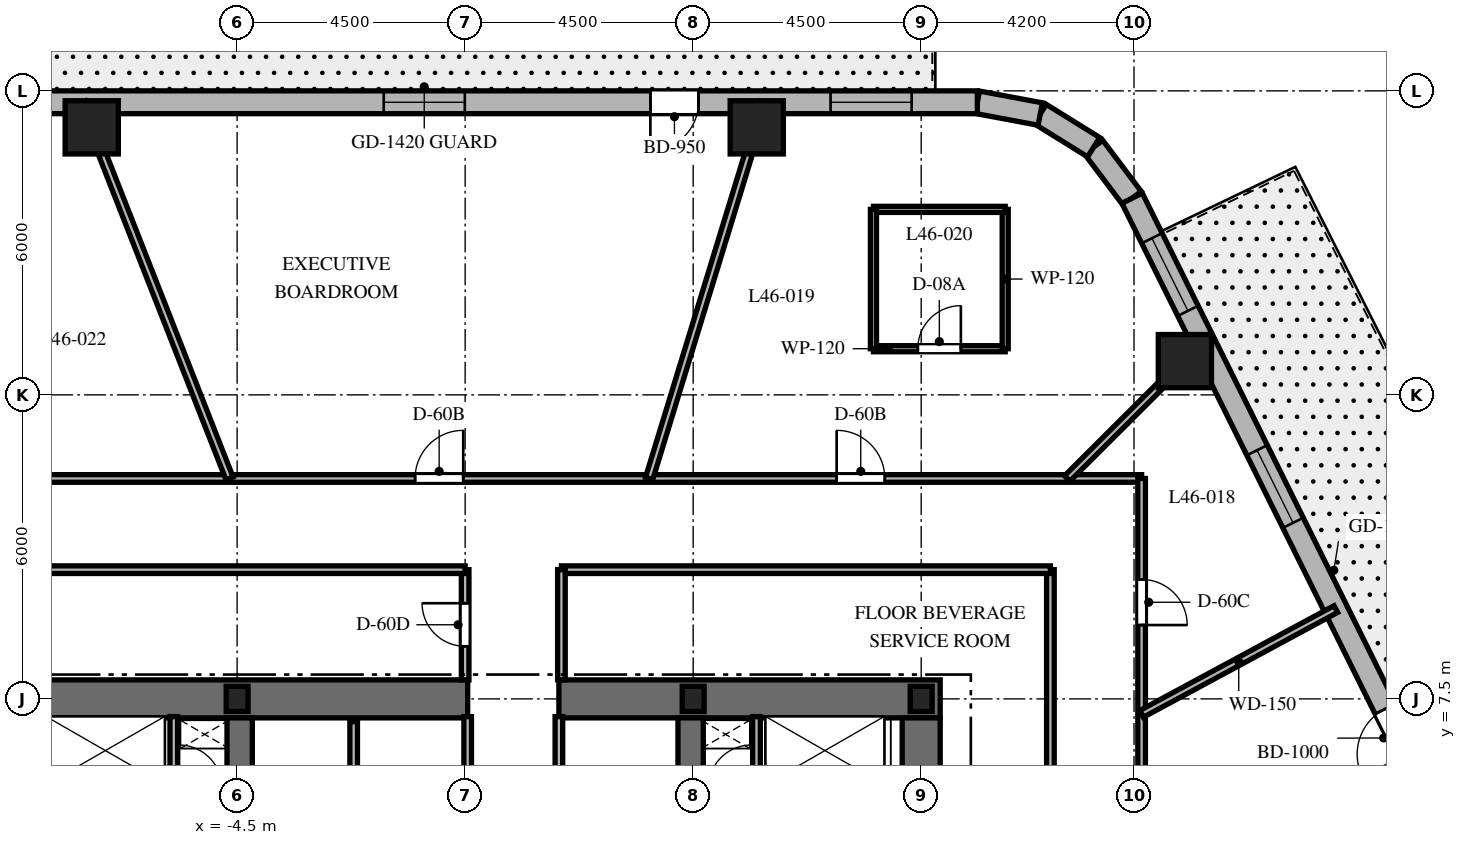
"""IFC4 building model, lengths in metres.
Left out: names, types, materials, properties, quantities, classifications, styles, units other than length and angle.
Written with IfcOpenShell. Run it as: python <this file> out.ifc"""

import sys

from ifc_helpers import new_model, si_unit, direction, frame, frame_2d, origin, origin_2d, place, context, subcontext, project, spatial, rectangle, i_section, extrude, element, fill, save


model = new_model("IFC4")
c1 = context("Model", 3, precision=1e-05, world=origin(), true_north=direction((0.0, 1.0)))
c2 = subcontext(c1, "Body", "Model", "MODEL_VIEW")
j1 = project(units=[si_unit("LENGTHUNIT", "METRE"), si_unit("PLANEANGLEUNIT", "RADIAN")], contexts=[c1])
p1 = place(None, origin())
s1 = spatial("IfcSite", under=j1, at=p1, CompositionType="ELEMENT")
p2 = place(p1, origin())
s2 = spatial("IfcBuilding", under=s1, at=p2, CompositionType="ELEMENT")
p3 = place(p2, frame((0.0, 0.0, 186.7)))
s3 = spatial("IfcBuildingStorey", under=s2, at=p3, CompositionType="ELEMENT", Elevation=186.7)
p4 = place(p3, frame((-9.375, 7.5, 0.0), z_axis=(0.0, 0.0, 1.0), x_axis=(1.0, 0.0, 0.0)))
e1 = element("IfcWall", 1, at=p4, inside=s3, PredefinedType="SHEAR", context=c2, shape_type="SweptSolid", body=[
    extrude(rectangle(XDim=9.425, YDim=0.75, at=frame_2d((4.712, 0.0))), origin(), (0.0, 0.0, 1.0), 3.7),
])
p5 = place(p3, frame((1.85, 7.5, 0.0), z_axis=(0.0, 0.0, 1.0), x_axis=(1.0, 0.0, 0.0)))
e2 = element("IfcWall", 2, at=p5, inside=s3, PredefinedType="SHEAR", context=c2, shape_type="SweptSolid", body=[
    extrude(rectangle(XDim=7.525, YDim=0.75, at=frame_2d((3.762, 0.0))), origin(), (0.0, 0.0, 1.0), 3.7),
])
p6 = place(p3, frame((9.0, -7.125, 0.0), z_axis=(0.0, 0.0, 1.0), x_axis=(0.0, 1.0, 0.0)))
e3 = element("IfcWall", 3, at=p6, inside=s3, PredefinedType="SHEAR", context=c2, shape_type="SweptSolid", body=[
    extrude(rectangle(XDim=14.25, YDim=0.75, at=frame_2d((7.125, 0.0))), origin(), (0.0, 0.0, 1.0), 3.7),
])
p7 = place(p6, frame((10.25, 0.0, 0.0)))
e4 = element("IfcOpeningElement", 4, at=p7, cuts=e3, PredefinedType="OPENING", context=c2, shape_type="SweptSolid", body=[
    extrude(rectangle(XDim=1.05, YDim=2.15, at=frame_2d((0.525, 1.075))), frame((0.0, 0.385, 0.0), z_axis=(0.0, -1.0, 0.0), x_axis=(1.0, 0.0, 0.0)), (0.0, 0.0, 1.0), 0.77),
])
for number, where, z_axis, x_axis in (
    (5, (-4.45, 2.25, 0.0), (0.0, 0.0, 1.0), (0.0, 1.0, 0.0)),
    (6, (4.45, 2.25, 0.0), (0.0, 0.0, 1.0), (0.0, 1.0, 0.0)),
):
    element("IfcWall", number, at=place(p3, frame(where, z_axis=z_axis, x_axis=x_axis)), inside=s3, PredefinedType="SHEAR", context=c2, shape_type="SweptSolid", body=[
        extrude(rectangle(XDim=4.875, YDim=0.5, at=frame_2d((2.438, 0.0))), origin(), (0.0, 0.0, 1.0), 3.7),
    ])
for number, where, z_axis, x_axis in (
    (7, (9.0, 7.5, 0.0), (0.0, 0.0, 1.0), (1.0, 0.0, 0.0)),
    (8, (4.5, 7.5, 0.0), (0.0, 0.0, 1.0), (1.0, 0.0, 0.0)),
    (9, (-4.5, 7.5, 0.0), (0.0, 0.0, 1.0), (1.0, 0.0, 0.0)),
):
    element("IfcColumn", number, at=place(p3, frame(where, z_axis=z_axis, x_axis=x_axis)), inside=s3, PredefinedType="COLUMN", context=c2, shape_type="SweptSolid", body=[
        extrude(i_section(OverallWidth=0.432, OverallDepth=0.498, WebThickness=0.056, FlangeThickness=0.089, at=origin_2d()), origin(), (0.0, 0.0, 1.0), 3.7),
    ])
for number, where, z_axis, x_axis in (
    (10, (14.204, 14.166, 0.0), (0.0, 0.0, 1.0), (1.0, 0.0, 0.0)),
    (11, (5.755, 18.78, 0.0), (0.0, 0.0, 1.0), (1.0, 0.0, 0.0)),
    (12, (-7.369, 18.78, 0.0), (0.0, 0.0, 1.0), (1.0, 0.0, 0.0)),
):
    element("IfcColumn", number, at=place(p3, frame(where, z_axis=z_axis, x_axis=x_axis)), inside=s3, PredefinedType="COLUMN", context=c2, shape_type="SweptSolid", body=[
        extrude(rectangle(XDim=1.05, YDim=1.05, at=origin_2d()), origin(), (0.0, 0.0, 1.0), 3.7),
    ])
p8 = place(p3, frame((13.162, 17.381, 0.0), z_axis=(0.0, 0.0, 1.0), x_axis=(-0.601515770517, 0.798860925205, 0.0)))
e13 = element("IfcWall", 13, at=p8, inside=s3, PredefinedType="SOLIDWALL", context=c2, shape_type="SweptSolid", body=[
    extrude(rectangle(XDim=1.262, YDim=0.45, at=frame_2d((0.631, 0.0))), origin(), (0.0, 0.0, 1.0), 3.4),
])
p9 = place(p3, frame((12.403, 18.389, 0.0), z_axis=(0.0, 0.0, 1.0), x_axis=(-0.849795170926, 0.527113049991, 0.0)))
e14 = element("IfcWall", 14, at=p9, inside=s3, PredefinedType="SOLIDWALL", context=c2, shape_type="SweptSolid", body=[
    extrude(rectangle(XDim=1.241, YDim=0.45, at=frame_2d((0.62, 0.0))), origin(), (0.0, 0.0, 1.0), 3.4),
])
p10 = place(p3, frame((11.349, 19.043, 0.0), z_axis=(0.0, 0.0, 1.0), x_axis=(-0.982931267051, 0.183973161772, 0.0)))
e15 = element("IfcWall", 15, at=p10, inside=s3, PredefinedType="SOLIDWALL", context=c2, shape_type="SweptSolid", body=[
    extrude(rectangle(XDim=1.262, YDim=0.45, at=frame_2d((0.631, 0.0))), origin(), (0.0, 0.0, 1.0), 3.4),
])
p11 = place(p3, frame((20.618, 2.344, 0.0), z_axis=(0.0, 0.0, 1.0), x_axis=(-0.444243691097, 0.895905990002, 0.0)))
e16 = element("IfcWall", 16, at=p11, inside=s3, PredefinedType="SOLIDWALL", context=c2, shape_type="SweptSolid", body=[
    extrude(rectangle(XDim=16.784, YDim=0.45, at=frame_2d((8.392, 0.0))), origin(), (0.0, 0.0, 1.0), 3.4),
])
p12 = place(p11, frame((4.535, 0.0, 0.0)))
e17 = element("IfcOpeningElement", 17, at=p12, cuts=e16, PredefinedType="OPENING", context=c2, shape_type="SweptSolid", body=[
    extrude(rectangle(XDim=1.0, YDim=2.15, at=frame_2d((0.5, 1.075))), frame((0.0, 0.235, 0.0), z_axis=(0.0, -1.0, 0.0), x_axis=(1.0, 0.0, 0.0)), (0.0, 0.0, 1.0), 0.47),
])
p13 = place(p11, frame((9.633, 0.0, 0.8)))
e18 = element("IfcOpeningElement", 18, at=p13, cuts=e16, PredefinedType="OPENING", context=c2, shape_type="SweptSolid", body=[
    extrude(rectangle(XDim=1.6, YDim=1.75, at=frame_2d((0.8, 0.875))), frame((0.0, 0.235, 0.0), z_axis=(0.0, -1.0, 0.0), x_axis=(1.0, 0.0, 0.0)), (0.0, 0.0, 1.0), 0.47),
])
p14 = place(p11, frame((14.303, 0.0, 0.8)))
e19 = element("IfcOpeningElement", 19, at=p14, cuts=e16, PredefinedType="OPENING", context=c2, shape_type="SweptSolid", body=[
    extrude(rectangle(XDim=1.6, YDim=1.75, at=frame_2d((0.8, 0.875))), frame((0.0, 0.235, 0.0), z_axis=(0.0, -1.0, 0.0), x_axis=(1.0, 0.0, 0.0)), (0.0, 0.0, 1.0), 0.47),
])
p15 = place(p11, frame((0.931, 0.0, 0.8)))
e20 = element("IfcOpeningElement", 20, at=p15, cuts=e16, PredefinedType="OPENING", context=c2, shape_type="SweptSolid", body=[
    extrude(rectangle(XDim=1.6, YDim=1.75, at=frame_2d((0.8, 0.875))), frame((0.0, 0.235, 0.0), z_axis=(0.0, -1.0, 0.0), x_axis=(1.0, 0.0, 0.0)), (0.0, 0.0, 1.0), 0.47),
])
p16 = place(p3, frame((10.108, 19.275, 0.0), z_axis=(0.0, 0.0, 1.0), x_axis=(-1.0, 0.0, 0.0)))
e21 = element("IfcWall", 21, at=p16, inside=s3, PredefinedType="SOLIDWALL", context=c2, shape_type="SweptSolid", body=[
    extrude(rectangle(XDim=21.829, YDim=0.45, at=frame_2d((10.915, 0.0))), origin(), (0.0, 0.0, 1.0), 3.4),
])
p17 = place(p16, frame((5.503, 0.0, 0.0)))
e22 = element("IfcOpeningElement", 22, at=p17, cuts=e21, PredefinedType="OPENING", context=c2, shape_type="SweptSolid", body=[
    extrude(rectangle(XDim=0.95, YDim=2.15, at=frame_2d((0.475, 1.075))), frame((0.0, 0.235, 0.0), z_axis=(0.0, -1.0, 0.0), x_axis=(1.0, 0.0, 0.0)), (0.0, 0.0, 1.0), 0.47),
])
p18 = place(p16, frame((1.297, 0.0, 0.8)))
e23 = element("IfcOpeningElement", 23, at=p18, cuts=e21, PredefinedType="OPENING", context=c2, shape_type="SweptSolid", body=[
    extrude(rectangle(XDim=1.6, YDim=1.75, at=frame_2d((0.8, 0.875))), frame((0.0, 0.235, 0.0), z_axis=(0.0, -1.0, 0.0), x_axis=(1.0, 0.0, 0.0)), (0.0, 0.0, 1.0), 0.47),
])
p19 = place(p16, frame((10.115, 0.0, 0.8)))
e24 = element("IfcOpeningElement", 24, at=p19, cuts=e21, PredefinedType="OPENING", context=c2, shape_type="SweptSolid", body=[
    extrude(rectangle(XDim=1.6, YDim=1.75, at=frame_2d((0.8, 0.875))), frame((0.0, 0.235, 0.0), z_axis=(0.0, -1.0, 0.0), x_axis=(1.0, 0.0, 0.0)), (0.0, 0.0, 1.0), 0.47),
])
p20 = place(p16, frame((18.933, 0.0, 0.8)))
e25 = element("IfcOpeningElement", 25, at=p20, cuts=e21, PredefinedType="OPENING", context=c2, shape_type="SweptSolid", body=[
    extrude(rectangle(XDim=1.6, YDim=1.75, at=frame_2d((0.8, 0.875))), frame((0.0, 0.235, 0.0), z_axis=(0.0, -1.0, 0.0), x_axis=(1.0, 0.0, 0.0)), (0.0, 0.0, 1.0), 0.47),
])
for number, where, z_axis, x_axis in (
    (26, (-5.75, 5.74, 0.0), (0.0, 0.0, 1.0), (0.0, 1.0, 0.0)),
    (27, (5.75, 5.74, 0.0), (0.0, 0.0, 1.0), (0.0, 1.0, 0.0)),
):
    element("IfcWall", number, at=place(p3, frame(where, z_axis=z_axis, x_axis=x_axis)), inside=s3, PredefinedType="PARTITIONING", context=c2, shape_type="SweptSolid", body=[
        extrude(rectangle(XDim=1.41, YDim=0.15, at=frame_2d((0.705, 0.0))), origin(), (0.0, 0.0, 1.0), 3.4),
    ])
p21 = place(p3, frame((-2.2, 5.2, 0.0), z_axis=(0.0, 0.0, 1.0), x_axis=(0.0, 1.0, 0.0)))
e28 = element("IfcWall", 28, at=p21, inside=s3, PredefinedType="PARTITIONING", context=c2, shape_type="SweptSolid", body=[
    extrude(rectangle(XDim=1.85, YDim=0.15, at=frame_2d((0.925, 0.0))), origin(), (0.0, 0.0, 1.0), 3.4),
])
for number, where, z_axis, x_axis in (
    (29, (0.05, 5.2, 0.0), (0.0, 0.0, 1.0), (0.0, 1.0, 0.0)),
    (30, (1.85, 5.2, 0.0), (0.0, 0.0, 1.0), (0.0, 1.0, 0.0)),
):
    element("IfcWall", number, at=place(p3, frame(where, z_axis=z_axis, x_axis=x_axis)), inside=s3, PredefinedType="PARTITIONING", context=c2, shape_type="SweptSolid", body=[
        extrude(rectangle(XDim=1.95, YDim=0.15, at=frame_2d((0.975, 0.0))), origin(), (0.0, 0.0, 1.0), 3.4),
    ])
p22 = place(p3, frame((-13.35, 11.85, 0.0), z_axis=(0.0, 0.0, 1.0), x_axis=(1.0, 0.0, 0.0)))
e31 = element("IfcWall", 31, at=p22, inside=s3, PredefinedType="PARTITIONING", context=c2, shape_type="SweptSolid", body=[
    extrude(rectangle(XDim=26.7, YDim=0.15, at=frame_2d((13.35, 0.0))), origin(), (0.0, 0.0, 1.0), 2.84),
])
p23 = place(p22, frame((20.682, 0.0, 0.0)))
e32 = element("IfcOpeningElement", 32, at=p23, cuts=e31, PredefinedType="OPENING", context=c2, shape_type="SweptSolid", body=[
    extrude(rectangle(XDim=0.95, YDim=2.03, at=frame_2d((0.475, 1.015))), frame((0.0, 0.085, 0.0), z_axis=(0.0, -1.0, 0.0), x_axis=(1.0, 0.0, 0.0)), (0.0, 0.0, 1.0), 0.17),
])
p24 = place(p22, frame((12.362, 0.0, 0.0)))
e33 = element("IfcOpeningElement", 33, at=p24, cuts=e31, PredefinedType="OPENING", context=c2, shape_type="SweptSolid", body=[
    extrude(rectangle(XDim=0.95, YDim=2.03, at=frame_2d((0.475, 1.015))), frame((0.0, 0.085, 0.0), z_axis=(0.0, -1.0, 0.0), x_axis=(1.0, 0.0, 0.0)), (0.0, 0.0, 1.0), 0.17),
])
p25 = place(p22, frame((3.995, 0.0, 0.0)))
e34 = element("IfcOpeningElement", 34, at=p25, cuts=e31, PredefinedType="OPENING", context=c2, shape_type="SweptSolid", body=[
    extrude(rectangle(XDim=0.95, YDim=2.03, at=frame_2d((0.475, 1.015))), frame((0.0, 0.085, 0.0), z_axis=(0.0, -1.0, 0.0), x_axis=(1.0, 0.0, 0.0)), (0.0, 0.0, 1.0), 0.17),
])
p26 = place(p3, frame((13.35, 11.85, 0.0), z_axis=(0.0, 0.0, 1.0), x_axis=(0.0, -1.0, 0.0)))
e35 = element("IfcWall", 35, at=p26, inside=s3, PredefinedType="PARTITIONING", context=c2, shape_type="SweptSolid", body=[
    extrude(rectangle(XDim=23.7, YDim=0.15, at=frame_2d((11.85, 0.0))), origin(), (0.0, 0.0, 1.0), 2.84),
])
p27 = place(p26, frame((5.951, 0.0, 0.0)))
e36 = element("IfcOpeningElement", 36, at=p27, cuts=e35, PredefinedType="OPENING", context=c2, shape_type="SweptSolid", body=[
    extrude(rectangle(XDim=0.9, YDim=2.03, at=frame_2d((0.45, 1.015))), frame((0.0, 0.085, 0.0), z_axis=(0.0, -1.0, 0.0), x_axis=(1.0, 0.0, 0.0)), (0.0, 0.0, 1.0), 0.17),
])
p28 = place(p26, frame((1.993, 0.0, 0.0)))
e37 = element("IfcOpeningElement", 37, at=p28, cuts=e35, PredefinedType="OPENING", context=c2, shape_type="SweptSolid", body=[
    extrude(rectangle(XDim=0.9, YDim=2.03, at=frame_2d((0.45, 1.015))), frame((0.0, 0.085, 0.0), z_axis=(0.0, -1.0, 0.0), x_axis=(1.0, 0.0, 0.0)), (0.0, 0.0, 1.0), 0.17),
])
p29 = place(p26, frame((18.364, 0.0, 0.0)))
e38 = element("IfcOpeningElement", 38, at=p29, cuts=e35, PredefinedType="OPENING", context=c2, shape_type="SweptSolid", body=[
    extrude(rectangle(XDim=1.0, YDim=2.03, at=frame_2d((0.5, 1.015))), frame((0.0, 0.085, 0.0), z_axis=(0.0, -1.0, 0.0), x_axis=(1.0, 0.0, 0.0)), (0.0, 0.0, 1.0), 0.17),
])
p30 = place(p3, frame((11.55, 4.6, 0.0), z_axis=(0.0, 0.0, 1.0), x_axis=(0.0, 1.0, 0.0)))
e39 = element("IfcWall", 39, at=p30, inside=s3, PredefinedType="PARTITIONING", context=c2, shape_type="SweptSolid", body=[
    extrude(rectangle(XDim=5.45, YDim=0.15, at=frame_2d((2.725, 0.0))), origin(), (0.0, 0.0, 1.0), 2.84),
])
p31 = place(p3, frame((11.55, 10.05, 0.0), z_axis=(0.0, 0.0, 1.0), x_axis=(-1.0, 0.0, 0.0)))
e40 = element("IfcWall", 40, at=p31, inside=s3, PredefinedType="PARTITIONING", context=c2, shape_type="SweptSolid", body=[
    extrude(rectangle(XDim=9.65, YDim=0.15, at=frame_2d((4.825, 0.0))), origin(), (0.0, 0.0, 1.0), 2.84),
])
p32 = place(p3, frame((1.9, 10.05, 0.0), z_axis=(0.0, 0.0, 1.0), x_axis=(0.0, -1.0, 0.0)))
e41 = element("IfcWall", 41, at=p32, inside=s3, PredefinedType="PARTITIONING", context=c2, shape_type="SweptSolid", body=[
    extrude(rectangle(XDim=2.175, YDim=0.15, at=frame_2d((1.087, 0.0))), origin(), (0.0, 0.0, 1.0), 3.4),
])
p33 = place(p3, frame((0.0, 7.875, 0.0), z_axis=(0.0, 0.0, 1.0), x_axis=(0.0, 1.0, 0.0)))
e42 = element("IfcWall", 42, at=p33, inside=s3, PredefinedType="PARTITIONING", context=c2, shape_type="SweptSolid", body=[
    extrude(rectangle(XDim=2.175, YDim=0.15, at=frame_2d((1.087, 0.0))), origin(), (0.0, 0.0, 1.0), 3.4),
])
p34 = place(p33, frame((0.663, 0.0, 0.0)))
e43 = element("IfcOpeningElement", 43, at=p34, cuts=e42, PredefinedType="OPENING", context=c2, shape_type="SweptSolid", body=[
    extrude(rectangle(XDim=0.85, YDim=2.03, at=frame_2d((0.425, 1.015))), frame((0.0, 0.085, 0.0), z_axis=(0.0, -1.0, 0.0), x_axis=(1.0, 0.0, 0.0)), (0.0, 0.0, 1.0), 0.17),
])
p35 = place(p3, frame((0.0, 10.05, 0.0), z_axis=(0.0, 0.0, 1.0), x_axis=(-1.0, 0.0, 0.0)))
e44 = element("IfcWall", 44, at=p35, inside=s3, PredefinedType="PARTITIONING", context=c2, shape_type="SweptSolid", body=[
    extrude(rectangle(XDim=11.55, YDim=0.15, at=frame_2d((5.775, 0.0))), origin(), (0.0, 0.0, 1.0), 2.84),
])
p36 = place(p3, frame((13.35, 7.204, 0.0), z_axis=(0.0, 0.0, 1.0), x_axis=(0.880033329067, 0.474911928394, 0.0)))
e45 = element("IfcWall", 45, at=p36, inside=s3, PredefinedType="PARTITIONING", context=c2, shape_type="SweptSolid", body=[
    extrude(rectangle(XDim=4.355, YDim=0.15, at=frame_2d((2.178, 0.0))), origin(), (0.0, 0.0, 1.0), 2.64),
])
p37 = place(p3, frame((11.882, 11.85, 0.0), z_axis=(0.0, 0.0, 1.0), x_axis=(0.708037373639, 0.706174962407, 0.0)))
e46 = element("IfcWall", 46, at=p37, inside=s3, PredefinedType="PARTITIONING", context=c2, shape_type="SweptSolid", body=[
    extrude(rectangle(XDim=3.802, YDim=0.15, at=frame_2d((1.901, 0.0))), origin(), (0.0, 0.0, 1.0), 2.64),
])
p38 = place(p3, frame((3.631, 11.85, 0.0), z_axis=(0.0, 0.0, 1.0), x_axis=(0.293007573338, 0.956110120209, 0.0)))
e47 = element("IfcWall", 47, at=p38, inside=s3, PredefinedType="PARTITIONING", context=c2, shape_type="SweptSolid", body=[
    extrude(rectangle(XDim=7.766, YDim=0.15, at=frame_2d((3.883, 0.0))), origin(), (0.0, 0.0, 1.0), 2.64),
])
p39 = place(p3, frame((-4.65, 11.85, 0.0), z_axis=(0.0, 0.0, 1.0), x_axis=(-0.365265947993, 0.930903210456, 0.0)))
e48 = element("IfcWall", 48, at=p39, inside=s3, PredefinedType="PARTITIONING", context=c2, shape_type="SweptSolid", body=[
    extrude(rectangle(XDim=7.976, YDim=0.15, at=frame_2d((3.988, 0.0))), origin(), (0.0, 0.0, 1.0), 2.64),
])
p40 = place(p3, frame((8.058, 14.411, 0.0), z_axis=(0.0, 0.0, 1.0), x_axis=(1.0, 0.0, 0.0)))
e49 = element("IfcWall", 49, at=p40, inside=s3, PredefinedType="PARTITIONING", context=c2, shape_type="SweptSolid", body=[
    extrude(rectangle(XDim=2.6, YDim=0.12, at=frame_2d((1.3, 0.0))), origin(), (0.0, 0.0, 1.0), 3.4),
])
p41 = place(p40, frame((0.875, 0.0, 0.0)))
e50 = element("IfcOpeningElement", 50, at=p41, cuts=e49, PredefinedType="OPENING", context=c2, shape_type="SweptSolid", body=[
    extrude(rectangle(XDim=0.85, YDim=2.03, at=frame_2d((0.425, 1.015))), frame((0.0, 0.07, 0.0), z_axis=(0.0, -1.0, 0.0), x_axis=(1.0, 0.0, 0.0)), (0.0, 0.0, 1.0), 0.14),
])
p42 = place(p3, frame((10.658, 14.411, 0.0), z_axis=(0.0, 0.0, 1.0), x_axis=(0.0, 1.0, 0.0)))
e51 = element("IfcWall", 51, at=p42, inside=s3, PredefinedType="PARTITIONING", context=c2, shape_type="SweptSolid", body=[
    extrude(rectangle(XDim=2.75, YDim=0.12, at=frame_2d((1.375, 0.0))), origin(), (0.0, 0.0, 1.0), 2.64),
])
p43 = place(p3, frame((10.658, 17.161, 0.0), z_axis=(0.0, 0.0, 1.0), x_axis=(-1.0, 0.0, 0.0)))
e52 = element("IfcWall", 52, at=p43, inside=s3, PredefinedType="PARTITIONING", context=c2, shape_type="SweptSolid", body=[
    extrude(rectangle(XDim=2.6, YDim=0.12, at=frame_2d((1.3, 0.0))), origin(), (0.0, 0.0, 1.0), 2.64),
])
p44 = place(p3, frame((8.058, 17.161, 0.0), z_axis=(0.0, 0.0, 1.0), x_axis=(0.0, -1.0, 0.0)))
e53 = element("IfcWall", 53, at=p44, inside=s3, PredefinedType="PARTITIONING", context=c2, shape_type="SweptSolid", body=[
    extrude(rectangle(XDim=2.75, YDim=0.12, at=frame_2d((1.375, 0.0))), origin(), (0.0, 0.0, 1.0), 3.4),
])
p45 = place(p12, origin())
e54 = element("IfcDoor", 54, at=p45, inside=s3, OperationType="SINGLE_SWING_LEFT", PredefinedType="DOOR", context=c2, shape_type="SweptSolid", body=[
    extrude(rectangle(XDim=1.0, YDim=2.15, at=frame_2d((0.5, 1.075))), frame((0.0, 0.025, 0.0), z_axis=(0.0, -1.0, 0.0), x_axis=(1.0, 0.0, 0.0)), (0.0, 0.0, 1.0), 0.05),
])
fill(e17, e54)
p46 = place(p13, origin())
e55 = element("IfcWindow", 55, at=p46, inside=s3, PartitioningType="SINGLE_PANEL", PredefinedType="WINDOW", context=c2, shape_type="SweptSolid", body=[
    extrude(rectangle(XDim=1.6, YDim=1.75, at=frame_2d((0.8, 0.875))), frame((0.0, 0.03, 0.0), z_axis=(0.0, -1.0, 0.0), x_axis=(1.0, 0.0, 0.0)), (0.0, 0.0, 1.0), 0.06),
])
fill(e18, e55)
p47 = place(p14, origin())
e56 = element("IfcWindow", 56, at=p47, inside=s3, PartitioningType="SINGLE_PANEL", PredefinedType="WINDOW", context=c2, shape_type="SweptSolid", body=[
    extrude(rectangle(XDim=1.6, YDim=1.75, at=frame_2d((0.8, 0.875))), frame((0.0, 0.03, 0.0), z_axis=(0.0, -1.0, 0.0), x_axis=(1.0, 0.0, 0.0)), (0.0, 0.0, 1.0), 0.06),
])
fill(e19, e56)
p48 = place(p17, origin())
e57 = element("IfcDoor", 57, at=p48, inside=s3, OperationType="SINGLE_SWING_RIGHT", PredefinedType="DOOR", context=c2, shape_type="SweptSolid", body=[
    extrude(rectangle(XDim=0.95, YDim=2.15, at=frame_2d((0.475, 1.075))), frame((0.0, 0.025, 0.0), z_axis=(0.0, -1.0, 0.0), x_axis=(1.0, 0.0, 0.0)), (0.0, 0.0, 1.0), 0.05),
])
fill(e22, e57)
p49 = place(p18, origin())
e58 = element("IfcWindow", 58, at=p49, inside=s3, PartitioningType="SINGLE_PANEL", PredefinedType="WINDOW", context=c2, shape_type="SweptSolid", body=[
    extrude(rectangle(XDim=1.6, YDim=1.75, at=frame_2d((0.8, 0.875))), frame((0.0, 0.03, 0.0), z_axis=(0.0, -1.0, 0.0), x_axis=(1.0, 0.0, 0.0)), (0.0, 0.0, 1.0), 0.06),
])
fill(e23, e58)
p50 = place(p19, origin())
e59 = element("IfcWindow", 59, at=p50, inside=s3, PartitioningType="SINGLE_PANEL", PredefinedType="WINDOW", context=c2, shape_type="SweptSolid", body=[
    extrude(rectangle(XDim=1.6, YDim=1.75, at=frame_2d((0.8, 0.875))), frame((0.0, 0.03, 0.0), z_axis=(0.0, -1.0, 0.0), x_axis=(1.0, 0.0, 0.0)), (0.0, 0.0, 1.0), 0.06),
])
fill(e24, e59)
p51 = place(p34, origin())
e60 = element("IfcDoor", 60, at=p51, inside=s3, OperationType="SINGLE_SWING_RIGHT", PredefinedType="DOOR", context=c2, shape_type="SweptSolid", body=[
    extrude(rectangle(XDim=0.85, YDim=2.03, at=frame_2d((0.425, 1.015))), frame((0.0, 0.025, 0.0), z_axis=(0.0, -1.0, 0.0), x_axis=(1.0, 0.0, 0.0)), (0.0, 0.0, 1.0), 0.05),
])
fill(e43, e60)
p52 = place(p28, origin())
e61 = element("IfcDoor", 61, at=p52, inside=s3, OperationType="SINGLE_SWING_RIGHT", PredefinedType="DOOR", context=c2, shape_type="SweptSolid", body=[
    extrude(rectangle(XDim=0.9, YDim=2.03, at=frame_2d((0.45, 1.015))), frame((0.0, 0.025, 0.0), z_axis=(0.0, -1.0, 0.0), x_axis=(1.0, 0.0, 0.0)), (0.0, 0.0, 1.0), 0.05),
])
fill(e37, e61)
p53 = place(p23, origin())
e62 = element("IfcDoor", 62, at=p53, inside=s3, OperationType="SINGLE_SWING_LEFT", PredefinedType="DOOR", context=c2, shape_type="SweptSolid", body=[
    extrude(rectangle(XDim=0.95, YDim=2.03, at=frame_2d((0.475, 1.015))), frame((0.0, 0.025, 0.0), z_axis=(0.0, -1.0, 0.0), x_axis=(1.0, 0.0, 0.0)), (0.0, 0.0, 1.0), 0.05),
])
fill(e32, e62)
p54 = place(p41, origin())
e63 = element("IfcDoor", 63, at=p54, inside=s3, OperationType="SINGLE_SWING_RIGHT", PredefinedType="DOOR", context=c2, shape_type="SweptSolid", body=[
    extrude(rectangle(XDim=0.85, YDim=2.03, at=frame_2d((0.425, 1.015))), frame((0.0, 0.025, 0.0), z_axis=(0.0, -1.0, 0.0), x_axis=(1.0, 0.0, 0.0)), (0.0, 0.0, 1.0), 0.05),
])
fill(e50, e63)
p55 = place(p24, origin())
e64 = element("IfcDoor", 64, at=p55, inside=s3, OperationType="SINGLE_SWING_RIGHT", PredefinedType="DOOR", context=c2, shape_type="SweptSolid", body=[
    extrude(rectangle(XDim=0.95, YDim=2.03, at=frame_2d((0.475, 1.015))), frame((0.0, 0.025, 0.0), z_axis=(0.0, -1.0, 0.0), x_axis=(1.0, 0.0, 0.0)), (0.0, 0.0, 1.0), 0.05),
])
fill(e33, e64)
save(model, sys.argv[1])
